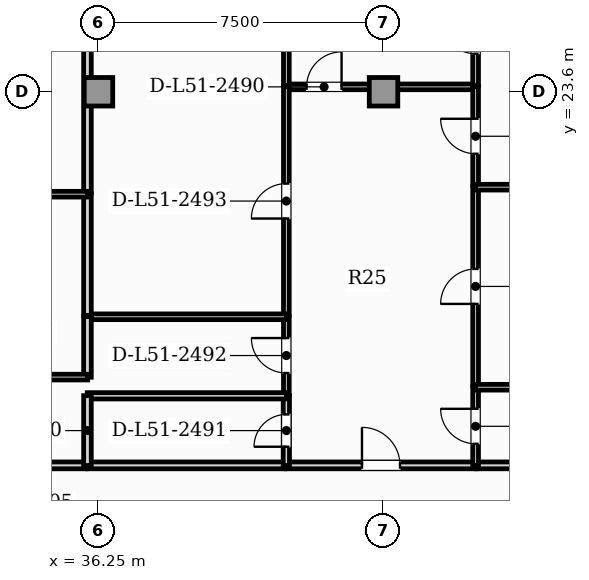
"""IFC4 building model, lengths in metres.
Left out: names, types, materials, properties, quantities, classifications, styles, units other than length and angle.
Written with IfcOpenShell. Run it as: python <this file> out.ifc"""

import sys

from ifc_helpers import new_model, si_unit, direction, frame, frame_2d, origin, origin_2d, place, context, subcontext, project, spatial, rectangle, extrude, element, fill, save


model = new_model("IFC4")
c1 = context("Model", 3, precision=1e-05, world=origin(), true_north=direction((0.0, 1.0)))
c2 = subcontext(c1, "Body", "Model", "MODEL_VIEW")
j1 = project(units=[si_unit("LENGTHUNIT", "METRE"), si_unit("PLANEANGLEUNIT", "RADIAN")], contexts=[c1])
p1 = place(None, origin())
s1 = spatial("IfcSite", under=j1, at=p1, CompositionType="ELEMENT")
p2 = place(p1, origin())
s2 = spatial("IfcBuilding", under=s1, at=p2, CompositionType="ELEMENT")
p3 = place(p2, frame((0.0, 0.0, 208.0)))
s3 = spatial("IfcBuildingStorey", under=s2, at=p3, CompositionType="ELEMENT", Elevation=208.0)
for number, where, z_axis, x_axis in (
    (1, (36.25, 23.6, 0.0), (0.0, 0.0, 1.0), (1.0, 0.0, 0.0)),
    (2, (43.75, 23.6, 0.0), (0.0, 0.0, 1.0), (1.0, 0.0, 0.0)),
):
    element("IfcColumn", number, at=place(p3, frame(where, z_axis=z_axis, x_axis=x_axis)), inside=s3, PredefinedType="COLUMN", context=c2, shape_type="SweptSolid", body=[
        extrude(rectangle(XDim=0.75, YDim=0.75, at=origin_2d()), origin(), (0.0, 0.0, 1.0), 3.85),
    ])
p4 = place(p3, frame((41.188, 13.77, 0.0), z_axis=(0.0, 0.0, 1.0), x_axis=(1.0, 0.0, 0.0)))
e3 = element("IfcWall", 3, at=p4, inside=s3, PredefinedType="PARTITIONING", context=c2, shape_type="SweptSolid", body=[
    extrude(rectangle(XDim=4.99, YDim=0.18, at=frame_2d((2.495, 0.0))), origin(), (0.0, 0.0, 1.0), 3.63),
])
p5 = place(p4, frame((1.995, 0.0, 0.0)))
e4 = element("IfcOpeningElement", 4, at=p5, cuts=e3, PredefinedType="OPENING", context=c2, shape_type="SweptSolid", body=[
    extrude(rectangle(XDim=1.0, YDim=2.15, at=frame_2d((0.5, 1.075))), frame((0.0, 0.1, 0.0), z_axis=(0.0, -1.0, 0.0), x_axis=(1.0, 0.0, 0.0)), (0.0, 0.0, 1.0), 0.2),
])
p6 = place(p3, frame((35.955, 13.77, 0.0), z_axis=(0.0, 0.0, 1.0), x_axis=(1.0, 0.0, 0.0)))
e5 = element("IfcWall", 5, at=p6, inside=s3, PredefinedType="PARTITIONING", context=c2, shape_type="SweptSolid", body=[
    extrude(rectangle(XDim=5.203, YDim=0.18, at=frame_2d((2.602, 0.0))), origin(), (0.0, 0.0, 1.0), 3.63),
])
p7 = place(p3, frame((46.208, 13.77, 0.0), z_axis=(0.0, 0.0, 1.0), x_axis=(1.0, 0.0, 0.0)))
e6 = element("IfcWall", 6, at=p7, inside=s3, PredefinedType="PARTITIONING", context=c2, shape_type="SweptSolid", body=[
    extrude(rectangle(XDim=5.919, YDim=0.18, at=frame_2d((2.96, 0.0))), origin(), (0.0, 0.0, 1.0), 3.63),
])
p8 = place(p3, frame((31.334, 13.77, 0.0), z_axis=(0.0, 0.0, 1.0), x_axis=(1.0, 0.0, 0.0)))
e7 = element("IfcWall", 7, at=p8, inside=s3, PredefinedType="PARTITIONING", context=c2, shape_type="SweptSolid", body=[
    extrude(rectangle(XDim=4.591, YDim=0.18, at=frame_2d((2.295, 0.0))), origin(), (0.0, 0.0, 1.0), 3.63),
])
p9 = place(p3, frame((41.188, 23.729, 0.0), z_axis=(0.0, 0.0, 1.0), x_axis=(1.0, 0.0, 0.0)))
e8 = element("IfcWall", 8, at=p9, inside=s3, PredefinedType="PARTITIONING", context=c2, shape_type="SweptSolid", body=[
    extrude(rectangle(XDim=4.99, YDim=0.15, at=frame_2d((2.495, 0.0))), origin(), (0.0, 0.0, 1.0), 3.085),
])
p10 = place(p9, frame((0.538, 0.0, 0.0)))
e9 = element("IfcOpeningElement", 9, at=p10, cuts=e8, PredefinedType="OPENING", context=c2, shape_type="SweptSolid", body=[
    extrude(rectangle(XDim=0.92, YDim=2.1, at=frame_2d((0.46, 1.05))), frame((0.0, 0.085, 0.0), z_axis=(0.0, -1.0, 0.0), x_axis=(1.0, 0.0, 0.0)), (0.0, 0.0, 1.0), 0.17),
])
p11 = place(p3, frame((41.193, 13.765, 0.0), z_axis=(0.0, 0.0, 1.0), x_axis=(0.0, 1.0, 0.0)))
e10 = element("IfcWall", 10, at=p11, inside=s3, PredefinedType="PLUMBINGWALL", context=c2, shape_type="SweptSolid", body=[
    extrude(rectangle(XDim=1.84, YDim=0.165, at=frame_2d((0.92, 0.0))), origin(), (0.0, 0.0, 1.0), 3.63),
])
p12 = place(p11, frame((0.495, 0.0, 0.0)))
e11 = element("IfcOpeningElement", 11, at=p12, cuts=e10, PredefinedType="OPENING", context=c2, shape_type="SweptSolid", body=[
    extrude(rectangle(XDim=0.85, YDim=2.1, at=frame_2d((0.425, 1.05))), frame((0.0, 0.093, 0.0), z_axis=(0.0, -1.0, 0.0), x_axis=(1.0, 0.0, 0.0)), (0.0, 0.0, 1.0), 0.185),
])
p13 = place(p3, frame((41.193, 15.635, 0.0), z_axis=(0.0, 0.0, 1.0), x_axis=(0.0, 1.0, 0.0)))
e12 = element("IfcWall", 12, at=p13, inside=s3, PredefinedType="PARTITIONING", context=c2, shape_type="SweptSolid", body=[
    extrude(rectangle(XDim=2.05, YDim=0.15, at=frame_2d((1.025, 0.0))), origin(), (0.0, 0.0, 1.0), 3.63),
])
p14 = place(p13, frame((0.565, 0.0, 0.0)))
e13 = element("IfcOpeningElement", 13, at=p14, cuts=e12, PredefinedType="OPENING", context=c2, shape_type="SweptSolid", body=[
    extrude(rectangle(XDim=0.92, YDim=2.1, at=frame_2d((0.46, 1.05))), frame((0.0, 0.085, 0.0), z_axis=(0.0, -1.0, 0.0), x_axis=(1.0, 0.0, 0.0)), (0.0, 0.0, 1.0), 0.17),
])
p15 = place(p3, frame((41.193, 17.715, 0.0), z_axis=(0.0, 0.0, 1.0), x_axis=(0.0, 1.0, 0.0)))
e14 = element("IfcWall", 14, at=p15, inside=s3, PredefinedType="PARTITIONING", context=c2, shape_type="SweptSolid", body=[
    extrude(rectangle(XDim=6.019, YDim=0.15, at=frame_2d((3.01, 0.0))), origin(), (0.0, 0.0, 1.0), 3.63),
])
p16 = place(p15, frame((2.55, 0.0, 0.0)))
e15 = element("IfcOpeningElement", 15, at=p16, cuts=e14, PredefinedType="OPENING", context=c2, shape_type="SweptSolid", body=[
    extrude(rectangle(XDim=0.92, YDim=2.1, at=frame_2d((0.46, 1.05))), frame((0.0, 0.085, 0.0), z_axis=(0.0, -1.0, 0.0), x_axis=(1.0, 0.0, 0.0)), (0.0, 0.0, 1.0), 0.17),
])
p17 = place(p3, frame((46.173, 13.765, 0.0), z_axis=(0.0, 0.0, 1.0), x_axis=(0.0, 1.0, 0.0)))
e16 = element("IfcWall", 16, at=p17, inside=s3, PredefinedType="PARTITIONING", context=c2, shape_type="SweptSolid", body=[
    extrude(rectangle(XDim=2.066, YDim=0.15, at=frame_2d((1.033, 0.0))), origin(), (0.0, 0.0, 1.0), 3.63),
])
p18 = place(p17, frame((0.573, 0.0, 0.0)))
e17 = element("IfcOpeningElement", 17, at=p18, cuts=e16, PredefinedType="OPENING", context=c2, shape_type="SweptSolid", body=[
    extrude(rectangle(XDim=0.92, YDim=2.1, at=frame_2d((0.46, 1.05))), frame((0.0, 0.085, 0.0), z_axis=(0.0, -1.0, 0.0), x_axis=(1.0, 0.0, 0.0)), (0.0, 0.0, 1.0), 0.17),
])
p19 = place(p3, frame((46.173, 15.861, 0.0), z_axis=(0.0, 0.0, 1.0), x_axis=(0.0, 1.0, 0.0)))
e18 = element("IfcWall", 18, at=p19, inside=s3, PredefinedType="PARTITIONING", context=c2, shape_type="SweptSolid", body=[
    extrude(rectangle(XDim=5.234, YDim=0.15, at=frame_2d((2.617, 0.0))), origin(), (0.0, 0.0, 1.0), 3.63),
])
p20 = place(p19, frame((2.157, 0.0, 0.0)))
e19 = element("IfcOpeningElement", 19, at=p20, cuts=e18, PredefinedType="OPENING", context=c2, shape_type="SweptSolid", body=[
    extrude(rectangle(XDim=0.92, YDim=2.1, at=frame_2d((0.46, 1.05))), frame((0.0, 0.085, 0.0), z_axis=(0.0, -1.0, 0.0), x_axis=(1.0, 0.0, 0.0)), (0.0, 0.0, 1.0), 0.17),
])
p21 = place(p3, frame((46.173, 21.125, 0.0), z_axis=(0.0, 0.0, 1.0), x_axis=(0.0, 1.0, 0.0)))
e20 = element("IfcWall", 20, at=p21, inside=s3, PredefinedType="PARTITIONING", context=c2, shape_type="SweptSolid", body=[
    extrude(rectangle(XDim=2.609, YDim=0.15, at=frame_2d((1.305, 0.0))), origin(), (0.0, 0.0, 1.0), 3.63),
])
p22 = place(p21, frame((0.845, 0.0, 0.0)))
e21 = element("IfcOpeningElement", 21, at=p22, cuts=e20, PredefinedType="OPENING", context=c2, shape_type="SweptSolid", body=[
    extrude(rectangle(XDim=0.92, YDim=2.1, at=frame_2d((0.46, 1.05))), frame((0.0, 0.085, 0.0), z_axis=(0.0, -1.0, 0.0), x_axis=(1.0, 0.0, 0.0)), (0.0, 0.0, 1.0), 0.17),
])
p23 = place(p3, frame((41.193, 23.764, 0.0), z_axis=(0.0, 0.0, 1.0), x_axis=(0.0, 1.0, 0.0)))
e22 = element("IfcWall", 22, at=p23, inside=s3, PredefinedType="PARTITIONING", context=c2, shape_type="SweptSolid", body=[
    extrude(rectangle(XDim=9.141, YDim=0.15, at=frame_2d((4.57, 0.0))), origin(), (0.0, 0.0, 1.0), 3.63),
])
p24 = place(p23, frame((4.111, 0.0, 0.0)))
e23 = element("IfcOpeningElement", 23, at=p24, cuts=e22, PredefinedType="OPENING", context=c2, shape_type="SweptSolid", body=[
    extrude(rectangle(XDim=0.92, YDim=2.1, at=frame_2d((0.46, 1.05))), frame((0.0, 0.085, 0.0), z_axis=(0.0, -1.0, 0.0), x_axis=(1.0, 0.0, 0.0)), (0.0, 0.0, 1.0), 0.17),
])
p25 = place(p3, frame((46.173, 23.764, 0.0), z_axis=(0.0, 0.0, 1.0), x_axis=(0.0, 1.0, 0.0)))
e24 = element("IfcWall", 24, at=p25, inside=s3, PredefinedType="PARTITIONING", context=c2, shape_type="SweptSolid", body=[
    extrude(rectangle(XDim=2.594, YDim=0.15, at=frame_2d((1.297, 0.0))), origin(), (0.0, 0.0, 1.0), 3.63),
])
p26 = place(p25, frame((0.837, 0.0, 0.0)))
e25 = element("IfcOpeningElement", 25, at=p26, cuts=e24, PredefinedType="OPENING", context=c2, shape_type="SweptSolid", body=[
    extrude(rectangle(XDim=0.92, YDim=2.1, at=frame_2d((0.46, 1.05))), frame((0.0, 0.085, 0.0), z_axis=(0.0, -1.0, 0.0), x_axis=(1.0, 0.0, 0.0)), (0.0, 0.0, 1.0), 0.17),
])
p27 = place(p3, frame((35.955, 15.6, 0.0), z_axis=(0.0, 0.0, 1.0), x_axis=(1.0, 0.0, 0.0)))
e26 = element("IfcWall", 26, at=p27, inside=s3, PredefinedType="PLUMBINGWALL", context=c2, shape_type="SweptSolid", body=[
    extrude(rectangle(XDim=5.243, YDim=0.165, at=frame_2d((2.622, 0.0))), origin(), (0.0, 0.0, 1.0), 3.63),
])
p28 = place(p3, frame((35.96, 13.765, 0.0), z_axis=(0.0, 0.0, 1.0), x_axis=(0.0, 1.0, 0.0)))
e27 = element("IfcWall", 27, at=p28, inside=s3, PredefinedType="PARTITIONING", context=c2, shape_type="SweptSolid", body=[
    extrude(rectangle(XDim=1.84, YDim=0.2, at=frame_2d((0.92, 0.0))), origin(), (0.0, 0.0, 1.0), 3.63),
])
p29 = place(p3, frame((35.955, 17.68, 0.0), z_axis=(0.0, 0.0, 1.0), x_axis=(1.0, 0.0, 0.0)))
e28 = element("IfcWall", 28, at=p29, inside=s3, PredefinedType="PARTITIONING", context=c2, shape_type="SweptSolid", body=[
    extrude(rectangle(XDim=5.243, YDim=0.15, at=frame_2d((2.622, 0.0))), origin(), (0.0, 0.0, 1.0), 3.63),
])
p30 = place(p3, frame((35.96, 16.087, 0.0), z_axis=(0.0, 0.0, 1.0), x_axis=(0.0, 1.0, 0.0)))
e29 = element("IfcWall", 29, at=p30, inside=s3, PredefinedType="PARTITIONING", context=c2, shape_type="SweptSolid", body=[
    extrude(rectangle(XDim=1.597, YDim=0.2, at=frame_2d((0.799, 0.0))), origin(), (0.0, 0.0, 1.0), 3.63),
])
p31 = place(p3, frame((35.96, 17.715, 0.0), z_axis=(0.0, 0.0, 1.0), x_axis=(0.0, 1.0, 0.0)))
e30 = element("IfcWall", 30, at=p31, inside=s3, PredefinedType="PARTITIONING", context=c2, shape_type="SweptSolid", body=[
    extrude(rectangle(XDim=3.195, YDim=0.2, at=frame_2d((1.598, 0.0))), origin(), (0.0, 0.0, 1.0), 3.63),
])
p32 = place(p3, frame((35.96, 20.94, 0.0), z_axis=(0.0, 0.0, 1.0), x_axis=(0.0, 1.0, 0.0)))
e31 = element("IfcWall", 31, at=p32, inside=s3, PredefinedType="PARTITIONING", context=c2, shape_type="SweptSolid", body=[
    extrude(rectangle(XDim=6.025, YDim=0.2, at=frame_2d((3.013, 0.0))), origin(), (0.0, 0.0, 1.0), 3.63),
])
for number, where, z_axis, x_axis in (
    (32, (46.168, 15.826, 0.0), (0.0, 0.0, 1.0), (1.0, 0.0, 0.0)),
    (33, (46.168, 21.09, 0.0), (0.0, 0.0, 1.0), (1.0, 0.0, 0.0)),
):
    element("IfcWall", number, at=place(p3, frame(where, z_axis=z_axis, x_axis=x_axis)), inside=s3, PredefinedType="PARTITIONING", context=c2, shape_type="SweptSolid", body=[
        extrude(rectangle(XDim=5.959, YDim=0.15, at=frame_2d((2.979, 0.0))), origin(), (0.0, 0.0, 1.0), 3.63),
    ])
for number, where, z_axis, x_axis in (
    (34, (31.294, 16.093, 0.0), (0.0, 0.0, 1.0), (1.0, 0.0, 0.0)),
    (35, (31.294, 20.905, 0.0), (0.0, 0.0, 1.0), (1.0, 0.0, 0.0)),
):
    element("IfcWall", number, at=place(p3, frame(where, z_axis=z_axis, x_axis=x_axis)), inside=s3, PredefinedType="PARTITIONING", context=c2, shape_type="SweptSolid", body=[
        extrude(rectangle(XDim=4.671, YDim=0.15, at=frame_2d((2.335, 0.0))), origin(), (0.0, 0.0, 1.0), 3.63),
    ])
p33 = place(p5, origin())
e36 = element("IfcDoor", 36, at=p33, inside=s3, OperationType="SINGLE_SWING_LEFT", PredefinedType="DOOR", context=c2, shape_type="SweptSolid", body=[
    extrude(rectangle(XDim=1.0, YDim=2.15, at=frame_2d((0.5, 1.075))), frame((0.0, 0.025, 0.0), z_axis=(0.0, -1.0, 0.0), x_axis=(1.0, 0.0, 0.0)), (0.0, 0.0, 1.0), 0.05),
])
fill(e4, e36)
p34 = place(p10, origin())
e37 = element("IfcDoor", 37, at=p34, inside=s3, OperationType="SINGLE_SWING_RIGHT", PredefinedType="DOOR", context=c2, shape_type="SweptSolid", body=[
    extrude(rectangle(XDim=0.92, YDim=2.1, at=frame_2d((0.46, 1.05))), frame((0.0, 0.025, 0.0), z_axis=(0.0, -1.0, 0.0), x_axis=(1.0, 0.0, 0.0)), (0.0, 0.0, 1.0), 0.05),
])
fill(e9, e37)
p35 = place(p12, origin())
e38 = element("IfcDoor", 38, at=p35, inside=s3, OperationType="SINGLE_SWING_LEFT", PredefinedType="DOOR", context=c2, shape_type="SweptSolid", body=[
    extrude(rectangle(XDim=0.85, YDim=2.1, at=frame_2d((0.425, 1.05))), frame((0.0, 0.025, 0.0), z_axis=(0.0, -1.0, 0.0), x_axis=(1.0, 0.0, 0.0)), (0.0, 0.0, 1.0), 0.05),
])
fill(e11, e38)
p36 = place(p14, origin())
e39 = element("IfcDoor", 39, at=p36, inside=s3, OperationType="SINGLE_SWING_RIGHT", PredefinedType="DOOR", context=c2, shape_type="SweptSolid", body=[
    extrude(rectangle(XDim=0.92, YDim=2.1, at=frame_2d((0.46, 1.05))), frame((0.0, 0.025, 0.0), z_axis=(0.0, -1.0, 0.0), x_axis=(1.0, 0.0, 0.0)), (0.0, 0.0, 1.0), 0.05),
])
fill(e13, e39)
p37 = place(p16, origin())
e40 = element("IfcDoor", 40, at=p37, inside=s3, OperationType="SINGLE_SWING_LEFT", PredefinedType="DOOR", context=c2, shape_type="SweptSolid", body=[
    extrude(rectangle(XDim=0.92, YDim=2.1, at=frame_2d((0.46, 1.05))), frame((0.0, 0.025, 0.0), z_axis=(0.0, -1.0, 0.0), x_axis=(1.0, 0.0, 0.0)), (0.0, 0.0, 1.0), 0.05),
])
fill(e15, e40)
p38 = place(p18, origin())
e41 = element("IfcDoor", 41, at=p38, inside=s3, OperationType="SINGLE_SWING_RIGHT", PredefinedType="DOOR", context=c2, shape_type="SweptSolid", body=[
    extrude(rectangle(XDim=0.92, YDim=2.1, at=frame_2d((0.46, 1.05))), frame((0.0, 0.025, 0.0), z_axis=(0.0, -1.0, 0.0), x_axis=(1.0, 0.0, 0.0)), (0.0, 0.0, 1.0), 0.05),
])
fill(e17, e41)
p39 = place(p20, origin())
e42 = element("IfcDoor", 42, at=p39, inside=s3, OperationType="SINGLE_SWING_LEFT", PredefinedType="DOOR", context=c2, shape_type="SweptSolid", body=[
    extrude(rectangle(XDim=0.92, YDim=2.1, at=frame_2d((0.46, 1.05))), frame((0.0, 0.025, 0.0), z_axis=(0.0, -1.0, 0.0), x_axis=(1.0, 0.0, 0.0)), (0.0, 0.0, 1.0), 0.05),
])
fill(e19, e42)
p40 = place(p22, origin())
e43 = element("IfcDoor", 43, at=p40, inside=s3, OperationType="SINGLE_SWING_RIGHT", PredefinedType="DOOR", context=c2, shape_type="SweptSolid", body=[
    extrude(rectangle(XDim=0.92, YDim=2.1, at=frame_2d((0.46, 1.05))), frame((0.0, 0.025, 0.0), z_axis=(0.0, -1.0, 0.0), x_axis=(1.0, 0.0, 0.0)), (0.0, 0.0, 1.0), 0.05),
])
fill(e21, e43)
p41 = place(p26, origin())
e44 = element("IfcDoor", 44, at=p41, inside=s3, OperationType="SINGLE_SWING_RIGHT", PredefinedType="DOOR", context=c2, shape_type="SweptSolid", body=[
    extrude(rectangle(XDim=0.92, YDim=2.1, at=frame_2d((0.46, 1.05))), frame((0.0, 0.025, 0.0), z_axis=(0.0, -1.0, 0.0), x_axis=(1.0, 0.0, 0.0)), (0.0, 0.0, 1.0), 0.05),
])
fill(e25, e44)
save(model, sys.argv[1])
